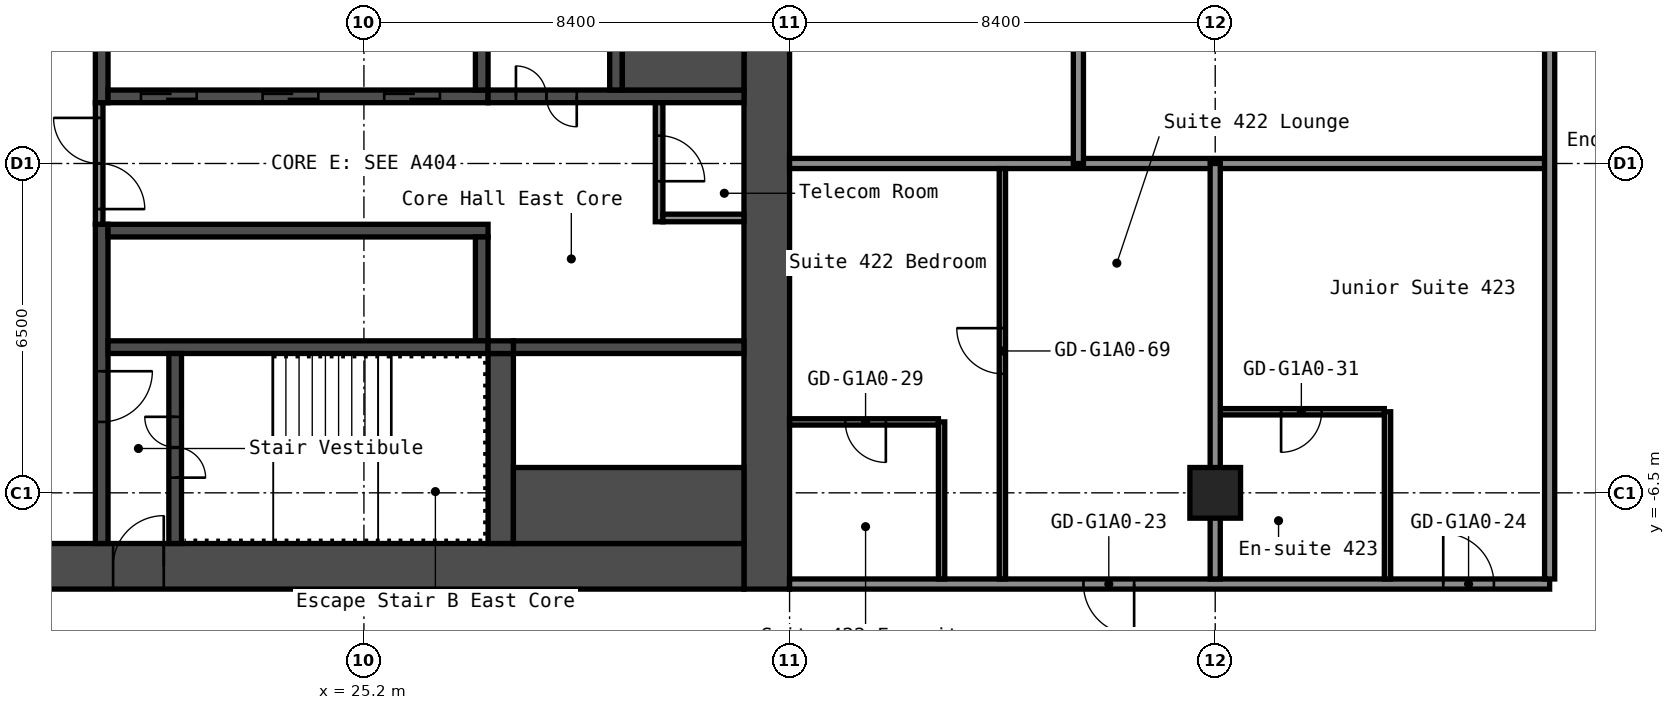
"""IFC4 building model, lengths in metres.
Left out: names, types, materials, properties, quantities, classifications, styles, units other than length and angle.
Written with IfcOpenShell. Run it as: python <this file> out.ifc"""

import sys

from ifc_helpers import new_model, si_unit, direction, frame, frame_2d, origin, origin_2d, place, context, subcontext, project, spatial, rectangle, hollow_rectangle, extrude, element, fill, save


model = new_model("IFC4")
c1 = context("Model", 3, precision=1e-05, world=origin(), true_north=direction((0.0, 1.0)))
c2 = subcontext(c1, "Body", "Model", "MODEL_VIEW")
j1 = project(units=[si_unit("LENGTHUNIT", "METRE"), si_unit("PLANEANGLEUNIT", "RADIAN")], contexts=[c1])
p1 = place(None, origin())
s1 = spatial("IfcSite", under=j1, at=p1, CompositionType="ELEMENT")
p2 = place(p1, origin())
s2 = spatial("IfcBuilding", under=s1, at=p2, CompositionType="ELEMENT")
p3 = place(p2, frame((0.0, 0.0, 19.8)))
s3 = spatial("IfcBuildingStorey", under=s2, at=p3, CompositionType="ELEMENT", Elevation=19.8)
p4 = place(p3, frame((42.0, -6.5, 0.0), z_axis=(0.0, 0.0, 1.0), x_axis=(1.0, 0.0, 0.0)))
e1 = element("IfcColumn", 1, at=p4, inside=s3, PredefinedType="COLUMN", context=c2, shape_type="SweptSolid", body=[
    extrude(hollow_rectangle(XDim=1.0, YDim=1.0, WallThickness=0.04, at=origin_2d()), origin(), (0.0, 0.0, 1.0), 2.8),
])
p5 = place(p3, frame((33.15, -8.4, 0.0), z_axis=(0.0, 0.0, 1.0), x_axis=(0.0, 1.0, 0.0)))
e2 = element("IfcWall", 2, at=p5, inside=s3, PredefinedType="SHEAR", context=c2, shape_type="SweptSolid", body=[
    extrude(rectangle(XDim=16.8, YDim=0.9, at=frame_2d((8.4, 0.0))), origin(), (0.0, 0.0, 1.0), 2.8),
])
p6 = place(p3, frame((17.7, -7.95, 0.0), z_axis=(0.0, 0.0, 1.0), x_axis=(1.0, 0.0, 0.0)))
e3 = element("IfcWall", 3, at=p6, inside=s3, PredefinedType="SHEAR", context=c2, shape_type="SweptSolid", body=[
    extrude(rectangle(XDim=15.0, YDim=0.9, at=frame_2d((7.5, 0.0))), origin(), (0.0, 0.0, 1.0), 2.8),
])
p7 = place(p6, frame((2.55, 0.0, 0.0)))
e4 = element("IfcOpeningElement", 4, at=p7, cuts=e3, PredefinedType="OPENING", context=c2, shape_type="SweptSolid", body=[
    extrude(rectangle(XDim=1.0, YDim=2.1, at=frame_2d((0.5, 1.05))), frame((0.0, 0.46, 0.0), z_axis=(0.0, -1.0, 0.0), x_axis=(1.0, 0.0, 0.0)), (0.0, 0.0, 1.0), 0.92),
])
p8 = place(p3, frame((20.025, 1.2, 0.0), z_axis=(0.0, 0.0, 1.0), x_axis=(0.0, 1.0, 0.0)))
e5 = element("IfcWall", 5, at=p8, inside=s3, PredefinedType="SHEAR", context=c2, shape_type="SweptSolid", body=[
    extrude(rectangle(XDim=6.3, YDim=0.25, at=frame_2d((3.15, 0.0))), origin(), (0.0, 0.0, 1.0), 2.8),
])
p9 = place(p3, frame((20.025, -7.5, 0.0), z_axis=(0.0, 0.0, 1.0), x_axis=(0.0, 1.0, 0.0)))
e6 = element("IfcWall", 6, at=p9, inside=s3, PredefinedType="SHEAR", context=c2, shape_type="SweptSolid", body=[
    extrude(rectangle(XDim=6.3, YDim=0.25, at=frame_2d((3.15, 0.0))), origin(), (0.0, 0.0, 1.0), 2.8),
])
p10 = place(p9, frame((2.4, 0.0, 0.0)))
e7 = element("IfcOpeningElement", 7, at=p10, cuts=e6, PredefinedType="OPENING", context=c2, shape_type="SweptSolid", body=[
    extrude(rectangle(XDim=1.0, YDim=2.1, at=frame_2d((0.5, 1.05))), frame((0.0, 0.135, 0.0), z_axis=(0.0, -1.0, 0.0), x_axis=(1.0, 0.0, 0.0)), (0.0, 0.0, 1.0), 0.27),
])
p11 = place(p3, frame((20.15, 1.325, 0.0), z_axis=(0.0, 0.0, 1.0), x_axis=(1.0, 0.0, 0.0)))
e8 = element("IfcWall", 8, at=p11, inside=s3, PredefinedType="SHEAR", context=c2, shape_type="SweptSolid", body=[
    extrude(rectangle(XDim=7.5, YDim=0.25, at=frame_2d((3.75, 0.0))), origin(), (0.0, 0.0, 1.0), 2.8),
])
p12 = place(p11, frame((0.65, 0.0, 0.0)))
e9 = element("IfcOpeningElement", 9, at=p12, cuts=e8, PredefinedType="OPENING", context=c2, shape_type="SweptSolid", body=[
    extrude(rectangle(XDim=1.1, YDim=2.1, at=frame_2d((0.55, 1.05))), frame((0.0, 0.135, 0.0), z_axis=(0.0, -1.0, 0.0), x_axis=(1.0, 0.0, 0.0)), (0.0, 0.0, 1.0), 0.27),
])
p13 = place(p11, frame((3.05, 0.0, 0.0)))
e10 = element("IfcOpeningElement", 10, at=p13, cuts=e8, PredefinedType="OPENING", context=c2, shape_type="SweptSolid", body=[
    extrude(rectangle(XDim=1.1, YDim=2.1, at=frame_2d((0.55, 1.05))), frame((0.0, 0.135, 0.0), z_axis=(0.0, -1.0, 0.0), x_axis=(1.0, 0.0, 0.0)), (0.0, 0.0, 1.0), 0.27),
])
p14 = place(p11, frame((5.45, 0.0, 0.0)))
e11 = element("IfcOpeningElement", 11, at=p14, cuts=e8, PredefinedType="OPENING", context=c2, shape_type="SweptSolid", body=[
    extrude(rectangle(XDim=1.1, YDim=2.1, at=frame_2d((0.55, 1.05))), frame((0.0, 0.135, 0.0), z_axis=(0.0, -1.0, 0.0), x_axis=(1.0, 0.0, 0.0)), (0.0, 0.0, 1.0), 0.27),
])
p15 = place(p3, frame((27.525, 1.45, 0.0), z_axis=(0.0, 0.0, 1.0), x_axis=(0.0, 1.0, 0.0)))
e12 = element("IfcWall", 12, at=p15, inside=s3, PredefinedType="SHEAR", context=c2, shape_type="SweptSolid", body=[
    extrude(rectangle(XDim=2.05, YDim=0.25, at=frame_2d((1.025, 0.0))), origin(), (0.0, 0.0, 1.0), 2.8),
])
p16 = place(p3, frame((27.65, 1.325, 0.0), z_axis=(0.0, 0.0, 1.0), x_axis=(1.0, 0.0, 0.0)))
e13 = element("IfcWall", 13, at=p16, inside=s3, PredefinedType="SHEAR", context=c2, shape_type="SweptSolid", body=[
    extrude(rectangle(XDim=5.05, YDim=0.25, at=frame_2d((2.525, 0.0))), origin(), (0.0, 0.0, 1.0), 2.8),
])
p17 = place(p16, frame((0.55, 0.0, 0.0)))
e14 = element("IfcOpeningElement", 14, at=p17, cuts=e13, PredefinedType="OPENING", context=c2, shape_type="SweptSolid", body=[
    extrude(rectangle(XDim=1.2, YDim=2.1, at=frame_2d((0.6, 1.05))), frame((0.0, 0.135, 0.0), z_axis=(0.0, -1.0, 0.0), x_axis=(1.0, 0.0, 0.0)), (0.0, 0.0, 1.0), 0.27),
])
p18 = place(p3, frame((30.175, 1.45, 0.0), z_axis=(0.0, 0.0, 1.0), x_axis=(0.0, 1.0, 0.0)))
e15 = element("IfcWall", 15, at=p18, inside=s3, PredefinedType="SHEAR", context=c2, shape_type="SweptSolid", body=[
    extrude(rectangle(XDim=6.05, YDim=0.25, at=frame_2d((3.025, 0.0))), origin(), (0.0, 0.0, 1.0), 2.8),
])
p19 = place(p18, frame((2.625, 0.0, 0.0)))
e16 = element("IfcOpeningElement", 16, at=p19, cuts=e15, PredefinedType="OPENING", context=c2, shape_type="SweptSolid", body=[
    extrude(rectangle(XDim=1.1, YDim=2.1, at=frame_2d((0.55, 1.05))), frame((0.0, 0.135, 0.0), z_axis=(0.0, -1.0, 0.0), x_axis=(1.0, 0.0, 0.0)), (0.0, 0.0, 1.0), 0.27),
])
p20 = place(p3, frame((30.3, 2.375, 0.0), z_axis=(0.0, 0.0, 1.0), x_axis=(1.0, 0.0, 0.0)))
e17 = element("IfcWall", 17, at=p20, inside=s3, PredefinedType="SHEAR", context=c2, shape_type="SweptSolid", body=[
    extrude(rectangle(XDim=2.4, YDim=1.85, at=frame_2d((1.2, 0.0))), origin(), (0.0, 0.0, 1.0), 2.8),
])
p21 = place(p3, frame((20.15, -1.325, 0.0), z_axis=(0.0, 0.0, 1.0), x_axis=(1.0, 0.0, 0.0)))
e18 = element("IfcWall", 18, at=p21, inside=s3, PredefinedType="SHEAR", context=c2, shape_type="SweptSolid", body=[
    extrude(rectangle(XDim=7.5, YDim=0.25, at=frame_2d((3.75, 0.0))), origin(), (0.0, 0.0, 1.0), 2.8),
])
p22 = place(p3, frame((27.525, -3.5, 0.0), z_axis=(0.0, 0.0, 1.0), x_axis=(0.0, 1.0, 0.0)))
e19 = element("IfcWall", 19, at=p22, inside=s3, PredefinedType="SHEAR", context=c2, shape_type="SweptSolid", body=[
    extrude(rectangle(XDim=2.05, YDim=0.25, at=frame_2d((1.025, 0.0))), origin(), (0.0, 0.0, 1.0), 2.8),
])
p23 = place(p3, frame((20.15, -3.625, 0.0), z_axis=(0.0, 0.0, 1.0), x_axis=(1.0, 0.0, 0.0)))
e20 = element("IfcWall", 20, at=p23, inside=s3, PredefinedType="SHEAR", context=c2, shape_type="SweptSolid", body=[
    extrude(rectangle(XDim=7.5, YDim=0.25, at=frame_2d((3.75, 0.0))), origin(), (0.0, 0.0, 1.0), 2.8),
])
p24 = place(p3, frame((21.475, -7.5, 0.0), z_axis=(0.0, 0.0, 1.0), x_axis=(0.0, 1.0, 0.0)))
e21 = element("IfcWall", 21, at=p24, inside=s3, PredefinedType="SHEAR", context=c2, shape_type="SweptSolid", body=[
    extrude(rectangle(XDim=3.75, YDim=0.25, at=frame_2d((1.875, 0.0))), origin(), (0.0, 0.0, 1.0), 2.8),
])
p25 = place(p24, frame((1.3, 0.0, 0.0)))
e22 = element("IfcOpeningElement", 22, at=p25, cuts=e21, PredefinedType="OPENING", context=c2, shape_type="SweptSolid", body=[
    extrude(rectangle(XDim=1.2, YDim=2.1, at=frame_2d((0.6, 1.05))), frame((0.0, 0.135, 0.0), z_axis=(0.0, -1.0, 0.0), x_axis=(1.0, 0.0, 0.0)), (0.0, 0.0, 1.0), 0.27),
])
p26 = place(p3, frame((27.9, -7.5, 0.0), z_axis=(0.0, 0.0, 1.0), x_axis=(0.0, 1.0, 0.0)))
e23 = element("IfcWall", 23, at=p26, inside=s3, PredefinedType="SHEAR", context=c2, shape_type="SweptSolid", body=[
    extrude(rectangle(XDim=3.75, YDim=0.5, at=frame_2d((1.875, 0.0))), origin(), (0.0, 0.0, 1.0), 2.8),
])
p27 = place(p3, frame((28.15, -3.625, 0.0), z_axis=(0.0, 0.0, 1.0), x_axis=(1.0, 0.0, 0.0)))
e24 = element("IfcWall", 24, at=p27, inside=s3, PredefinedType="SHEAR", context=c2, shape_type="SweptSolid", body=[
    extrude(rectangle(XDim=4.55, YDim=0.25, at=frame_2d((2.275, 0.0))), origin(), (0.0, 0.0, 1.0), 2.8),
])
p28 = place(p3, frame((28.15, -6.75, 0.0), z_axis=(0.0, 0.0, 1.0), x_axis=(1.0, 0.0, 0.0)))
e25 = element("IfcWall", 25, at=p28, inside=s3, PredefinedType="SHEAR", context=c2, shape_type="SweptSolid", body=[
    extrude(rectangle(XDim=4.55, YDim=1.5, at=frame_2d((2.275, 0.0))), origin(), (0.0, 0.0, 1.0), 2.8),
])
p29 = place(p3, frame((27.65, -3.625, 0.0), z_axis=(0.0, 0.0, 1.0), x_axis=(1.0, 0.0, 0.0)))
e26 = element("IfcWall", 26, at=p29, inside=s3, PredefinedType="SHEAR", context=c2, shape_type="SweptSolid", body=[
    extrude(rectangle(XDim=0.5, YDim=0.25, at=frame_2d((0.25, 0.0))), origin(), (0.0, 0.0, 1.0), 2.8),
])
p30 = place(p3, frame((19.975, -1.2, 0.0), z_axis=(0.0, 0.0, 1.0), x_axis=(0.0, 1.0, 0.0)))
e27 = element("IfcWall", 27, at=p30, inside=s3, PredefinedType="PARTITIONING", context=c2, shape_type="SweptSolid", body=[
    extrude(rectangle(XDim=2.4, YDim=0.15, at=frame_2d((1.2, 0.0))), origin(), (0.0, 0.0, 1.0), 2.8),
])
p31 = place(p30, frame((0.3, 0.0, 0.0)))
e28 = element("IfcOpeningElement", 28, at=p31, cuts=e27, PredefinedType="OPENING", context=c2, shape_type="SweptSolid", body=[
    extrude(rectangle(XDim=1.8, YDim=2.1, at=frame_2d((0.9, 1.05))), frame((0.0, 0.085, 0.0), z_axis=(0.0, -1.0, 0.0), x_axis=(1.0, 0.0, 0.0)), (0.0, 0.0, 1.0), 0.17),
])
p32 = place(p3, frame((31.025, -1.15, 0.0), z_axis=(0.0, 0.0, 1.0), x_axis=(0.0, 1.0, 0.0)))
e29 = element("IfcWall", 29, at=p32, inside=s3, PredefinedType="PARTITIONING", context=c2, shape_type="SweptSolid", body=[
    extrude(rectangle(XDim=2.35, YDim=0.15, at=frame_2d((1.175, 0.0))), origin(), (0.0, 0.0, 1.0), 2.8),
])
p33 = place(p32, frame((0.8, 0.0, 0.0)))
e30 = element("IfcOpeningElement", 30, at=p33, cuts=e29, PredefinedType="OPENING", context=c2, shape_type="SweptSolid", body=[
    extrude(rectangle(XDim=0.9, YDim=2.1, at=frame_2d((0.45, 1.05))), frame((0.0, 0.085, 0.0), z_axis=(0.0, -1.0, 0.0), x_axis=(1.0, 0.0, 0.0)), (0.0, 0.0, 1.0), 0.17),
])
p34 = place(p3, frame((31.1, -1.075, 0.0), z_axis=(0.0, 0.0, 1.0), x_axis=(1.0, 0.0, 0.0)))
e31 = element("IfcWall", 31, at=p34, inside=s3, PredefinedType="PARTITIONING", context=c2, shape_type="SweptSolid", body=[
    extrude(rectangle(XDim=1.6, YDim=0.15, at=frame_2d((0.8, 0.0))), origin(), (0.0, 0.0, 1.0), 2.8),
])
p35 = place(p3, frame((33.6, -8.3, 0.0), z_axis=(0.0, 0.0, 1.0), x_axis=(1.0, 0.0, 0.0)))
e32 = element("IfcWall", 32, at=p35, inside=s3, PredefinedType="PARTITIONING", context=c2, shape_type="SweptSolid", body=[
    extrude(rectangle(XDim=15.0, YDim=0.2, at=frame_2d((7.5, 0.0))), origin(), (0.0, 0.0, 1.0), 2.8),
])
p36 = place(p35, frame((5.8, 0.0, 0.0)))
e33 = element("IfcOpeningElement", 33, at=p36, cuts=e32, PredefinedType="OPENING", context=c2, shape_type="SweptSolid", body=[
    extrude(rectangle(XDim=1.0, YDim=2.1, at=frame_2d((0.5, 1.05))), frame((0.0, 0.11, 0.0), z_axis=(0.0, -1.0, 0.0), x_axis=(1.0, 0.0, 0.0)), (0.0, 0.0, 1.0), 0.22),
])
p37 = place(p35, frame((12.9, 0.0, 0.0)))
e34 = element("IfcOpeningElement", 34, at=p37, cuts=e32, PredefinedType="OPENING", context=c2, shape_type="SweptSolid", body=[
    extrude(rectangle(XDim=1.0, YDim=2.1, at=frame_2d((0.5, 1.05))), frame((0.0, 0.11, 0.0), z_axis=(0.0, -1.0, 0.0), x_axis=(1.0, 0.0, 0.0)), (0.0, 0.0, 1.0), 0.22),
])
p38 = place(p3, frame((33.6, -5.1, 0.0), z_axis=(0.0, 0.0, 1.0), x_axis=(1.0, 0.0, 0.0)))
e35 = element("IfcWall", 35, at=p38, inside=s3, PredefinedType="PARTITIONING", context=c2, shape_type="SweptSolid", body=[
    extrude(rectangle(XDim=2.938, YDim=0.125, at=frame_2d((1.469, 0.0))), origin(), (0.0, 0.0, 1.0), 2.8),
])
p39 = place(p38, frame((1.1, 0.0, 0.0)))
e36 = element("IfcOpeningElement", 36, at=p39, cuts=e35, PredefinedType="OPENING", context=c2, shape_type="SweptSolid", body=[
    extrude(rectangle(XDim=0.8, YDim=2.1, at=frame_2d((0.4, 1.05))), frame((0.0, 0.073, 0.0), z_axis=(0.0, -1.0, 0.0), x_axis=(1.0, 0.0, 0.0)), (0.0, 0.0, 1.0), 0.145),
])
p40 = place(p3, frame((42.1, -4.9, 0.0), z_axis=(0.0, 0.0, 1.0), x_axis=(1.0, 0.0, 0.0)))
e37 = element("IfcWall", 37, at=p40, inside=s3, PredefinedType="PARTITIONING", context=c2, shape_type="SweptSolid", body=[
    extrude(rectangle(XDim=3.237, YDim=0.125, at=frame_2d((1.619, 0.0))), origin(), (0.0, 0.0, 1.0), 2.8),
])
p41 = place(p40, frame((1.2, 0.0, 0.0)))
e38 = element("IfcOpeningElement", 38, at=p41, cuts=e37, PredefinedType="OPENING", context=c2, shape_type="SweptSolid", body=[
    extrude(rectangle(XDim=0.8, YDim=2.1, at=frame_2d((0.4, 1.05))), frame((0.0, 0.073, 0.0), z_axis=(0.0, -1.0, 0.0), x_axis=(1.0, 0.0, 0.0)), (0.0, 0.0, 1.0), 0.145),
])
p42 = place(p3, frame((33.6, 0.0, 0.0), z_axis=(0.0, 0.0, 1.0), x_axis=(1.0, 0.0, 0.0)))
e39 = element("IfcWall", 39, at=p42, inside=s3, PredefinedType="PARTITIONING", context=c2, shape_type="SweptSolid", body=[
    extrude(rectangle(XDim=14.9, YDim=0.2, at=frame_2d((7.45, 0.0))), origin(), (0.0, 0.0, 1.0), 2.8),
])
p43 = place(p3, frame((36.6, -8.2, 0.0), z_axis=(0.0, 0.0, 1.0), x_axis=(0.0, 1.0, 0.0)))
e40 = element("IfcWall", 40, at=p43, inside=s3, PredefinedType="PARTITIONING", context=c2, shape_type="SweptSolid", body=[
    extrude(rectangle(XDim=3.1, YDim=0.125, at=frame_2d((1.55, 0.0))), origin(), (0.0, 0.0, 1.0), 2.8),
])
p44 = place(p3, frame((37.8, -8.2, 0.0), z_axis=(0.0, 0.0, 1.0), x_axis=(0.0, 1.0, 0.0)))
e41 = element("IfcWall", 41, at=p44, inside=s3, PredefinedType="PARTITIONING", context=c2, shape_type="SweptSolid", body=[
    extrude(rectangle(XDim=8.1, YDim=0.125, at=frame_2d((4.05, 0.0))), origin(), (0.0, 0.0, 1.0), 2.8),
])
p45 = place(p44, frame((4.05, 0.0, 0.0)))
e42 = element("IfcOpeningElement", 42, at=p45, cuts=e41, PredefinedType="OPENING", context=c2, shape_type="SweptSolid", body=[
    extrude(rectangle(XDim=0.9, YDim=2.1, at=frame_2d((0.45, 1.05))), frame((0.0, 0.073, 0.0), z_axis=(0.0, -1.0, 0.0), x_axis=(1.0, 0.0, 0.0)), (0.0, 0.0, 1.0), 0.145),
])
for number, where, z_axis, x_axis in (
    (43, (39.3, 0.0, 0.0), (0.0, 0.0, 1.0), (0.0, 1.0, 0.0)),
    (44, (42.0, -8.2, 0.0), (0.0, 0.0, 1.0), (0.0, 1.0, 0.0)),
):
    element("IfcWall", number, at=place(p3, frame(where, z_axis=z_axis, x_axis=x_axis)), inside=s3, PredefinedType="PARTITIONING", context=c2, shape_type="SweptSolid", body=[
        extrude(rectangle(XDim=8.2, YDim=0.2, at=frame_2d((4.1, 0.0))), origin(), (0.0, 0.0, 1.0), 2.8),
    ])
p46 = place(p3, frame((45.4, -8.2, 0.0), z_axis=(0.0, 0.0, 1.0), x_axis=(0.0, 1.0, 0.0)))
e45 = element("IfcWall", 45, at=p46, inside=s3, PredefinedType="PARTITIONING", context=c2, shape_type="SweptSolid", body=[
    extrude(rectangle(XDim=3.3, YDim=0.125, at=frame_2d((1.65, 0.0))), origin(), (0.0, 0.0, 1.0), 2.8),
])
p47 = place(p3, frame((48.6, -8.2, 0.0), z_axis=(0.0, 0.0, 1.0), x_axis=(0.0, 1.0, 0.0)))
e46 = element("IfcWall", 46, at=p47, inside=s3, PredefinedType="PARTITIONING", context=c2, shape_type="SweptSolid", body=[
    extrude(rectangle(XDim=16.4, YDim=0.2, at=frame_2d((8.2, 0.0))), origin(), (0.0, 0.0, 1.0), 2.8),
])
p48 = place(p7, origin())
e47 = element("IfcDoor", 47, at=p48, inside=s3, OperationType="SINGLE_SWING_LEFT", PredefinedType="DOOR", context=c2, shape_type="SweptSolid", body=[
    extrude(rectangle(XDim=1.0, YDim=2.1, at=frame_2d((0.5, 1.05))), frame((0.0, 0.025, 0.0), z_axis=(0.0, -1.0, 0.0), x_axis=(1.0, 0.0, 0.0)), (0.0, 0.0, 1.0), 0.05),
])
fill(e4, e47)
p49 = place(p25, origin())
e48 = element("IfcDoor", 48, at=p49, inside=s3, OperationType="DOUBLE_DOOR_SINGLE_SWING", PredefinedType="DOOR", context=c2, shape_type="SweptSolid", body=[
    extrude(rectangle(XDim=1.2, YDim=2.1, at=frame_2d((0.6, 1.05))), frame((0.0, 0.025, 0.0), z_axis=(0.0, -1.0, 0.0), x_axis=(1.0, 0.0, 0.0)), (0.0, 0.0, 1.0), 0.05),
])
fill(e22, e48)
p50 = place(p10, origin())
e49 = element("IfcDoor", 49, at=p50, inside=s3, OperationType="SINGLE_SWING_RIGHT", PredefinedType="DOOR", context=c2, shape_type="SweptSolid", body=[
    extrude(rectangle(XDim=1.0, YDim=2.1, at=frame_2d((0.5, 1.05))), frame((0.0, 0.025, 0.0), z_axis=(0.0, -1.0, 0.0), x_axis=(1.0, 0.0, 0.0)), (0.0, 0.0, 1.0), 0.05),
])
fill(e7, e49)
p51 = place(p17, origin())
e50 = element("IfcDoor", 50, at=p51, inside=s3, OperationType="DOUBLE_DOOR_SINGLE_SWING", PredefinedType="DOOR", context=c2, shape_type="SweptSolid", body=[
    extrude(rectangle(XDim=1.2, YDim=2.1, at=frame_2d((0.6, 1.05))), frame((0.0, 0.025, 0.0), z_axis=(0.0, -1.0, 0.0), x_axis=(1.0, 0.0, 0.0)), (0.0, 0.0, 1.0), 0.05),
])
fill(e14, e50)
p52 = place(p31, origin())
e51 = element("IfcDoor", 51, at=p52, inside=s3, OperationType="DOUBLE_DOOR_SINGLE_SWING", PredefinedType="DOOR", context=c2, shape_type="SweptSolid", body=[
    extrude(rectangle(XDim=1.8, YDim=2.1, at=frame_2d((0.9, 1.05))), frame((0.0, 0.025, 0.0), z_axis=(0.0, -1.0, 0.0), x_axis=(1.0, 0.0, 0.0)), (0.0, 0.0, 1.0), 0.05),
])
fill(e28, e51)
p53 = place(p33, origin())
e52 = element("IfcDoor", 52, at=p53, inside=s3, OperationType="SINGLE_SWING_LEFT", PredefinedType="DOOR", context=c2, shape_type="SweptSolid", body=[
    extrude(rectangle(XDim=0.9, YDim=2.1, at=frame_2d((0.45, 1.05))), frame((0.0, 0.025, 0.0), z_axis=(0.0, -1.0, 0.0), x_axis=(1.0, 0.0, 0.0)), (0.0, 0.0, 1.0), 0.05),
])
fill(e30, e52)
p54 = place(p12, origin())
e53 = element("IfcDoor", 53, at=p54, inside=s3, OperationType="DOUBLE_DOOR_SLIDING", PredefinedType="DOOR", context=c2, shape_type="SweptSolid", body=[
    extrude(rectangle(XDim=1.1, YDim=2.1, at=frame_2d((0.55, 1.05))), frame((0.0, 0.025, 0.0), z_axis=(0.0, -1.0, 0.0), x_axis=(1.0, 0.0, 0.0)), (0.0, 0.0, 1.0), 0.05),
])
fill(e9, e53)
p55 = place(p13, origin())
e54 = element("IfcDoor", 54, at=p55, inside=s3, OperationType="DOUBLE_DOOR_SLIDING", PredefinedType="DOOR", context=c2, shape_type="SweptSolid", body=[
    extrude(rectangle(XDim=1.1, YDim=2.1, at=frame_2d((0.55, 1.05))), frame((0.0, 0.025, 0.0), z_axis=(0.0, -1.0, 0.0), x_axis=(1.0, 0.0, 0.0)), (0.0, 0.0, 1.0), 0.05),
])
fill(e10, e54)
p56 = place(p14, origin())
e55 = element("IfcDoor", 55, at=p56, inside=s3, OperationType="DOUBLE_DOOR_SLIDING", PredefinedType="DOOR", context=c2, shape_type="SweptSolid", body=[
    extrude(rectangle(XDim=1.1, YDim=2.1, at=frame_2d((0.55, 1.05))), frame((0.0, 0.025, 0.0), z_axis=(0.0, -1.0, 0.0), x_axis=(1.0, 0.0, 0.0)), (0.0, 0.0, 1.0), 0.05),
])
fill(e11, e55)
p57 = place(p36, origin())
e56 = element("IfcDoor", 56, at=p57, inside=s3, OperationType="SINGLE_SWING_RIGHT", PredefinedType="DOOR", context=c2, shape_type="SweptSolid", body=[
    extrude(rectangle(XDim=1.0, YDim=2.1, at=frame_2d((0.5, 1.05))), frame((0.0, 0.025, 0.0), z_axis=(0.0, -1.0, 0.0), x_axis=(1.0, 0.0, 0.0)), (0.0, 0.0, 1.0), 0.05),
])
fill(e33, e56)
p58 = place(p37, origin())
e57 = element("IfcDoor", 57, at=p58, inside=s3, OperationType="SINGLE_SWING_RIGHT", PredefinedType="DOOR", context=c2, shape_type="SweptSolid", body=[
    extrude(rectangle(XDim=1.0, YDim=2.1, at=frame_2d((0.5, 1.05))), frame((0.0, 0.025, 0.0), z_axis=(0.0, -1.0, 0.0), x_axis=(1.0, 0.0, 0.0)), (0.0, 0.0, 1.0), 0.05),
])
fill(e34, e57)
p59 = place(p39, origin())
e58 = element("IfcDoor", 58, at=p59, inside=s3, OperationType="SINGLE_SWING_RIGHT", PredefinedType="DOOR", context=c2, shape_type="SweptSolid", body=[
    extrude(rectangle(XDim=0.8, YDim=2.1, at=frame_2d((0.4, 1.05))), frame((0.0, 0.025, 0.0), z_axis=(0.0, -1.0, 0.0), x_axis=(1.0, 0.0, 0.0)), (0.0, 0.0, 1.0), 0.05),
])
fill(e36, e58)
p60 = place(p41, origin())
e59 = element("IfcDoor", 59, at=p60, inside=s3, OperationType="SINGLE_SWING_LEFT", PredefinedType="DOOR", context=c2, shape_type="SweptSolid", body=[
    extrude(rectangle(XDim=0.8, YDim=2.1, at=frame_2d((0.4, 1.05))), frame((0.0, 0.025, 0.0), z_axis=(0.0, -1.0, 0.0), x_axis=(1.0, 0.0, 0.0)), (0.0, 0.0, 1.0), 0.05),
])
fill(e38, e59)
p61 = place(p45, origin())
e60 = element("IfcDoor", 60, at=p61, inside=s3, OperationType="SINGLE_SWING_LEFT", PredefinedType="DOOR", context=c2, shape_type="SweptSolid", body=[
    extrude(rectangle(XDim=0.9, YDim=2.1, at=frame_2d((0.45, 1.05))), frame((0.0, 0.025, 0.0), z_axis=(0.0, -1.0, 0.0), x_axis=(1.0, 0.0, 0.0)), (0.0, 0.0, 1.0), 0.05),
])
fill(e42, e60)
save(model, sys.argv[1])
